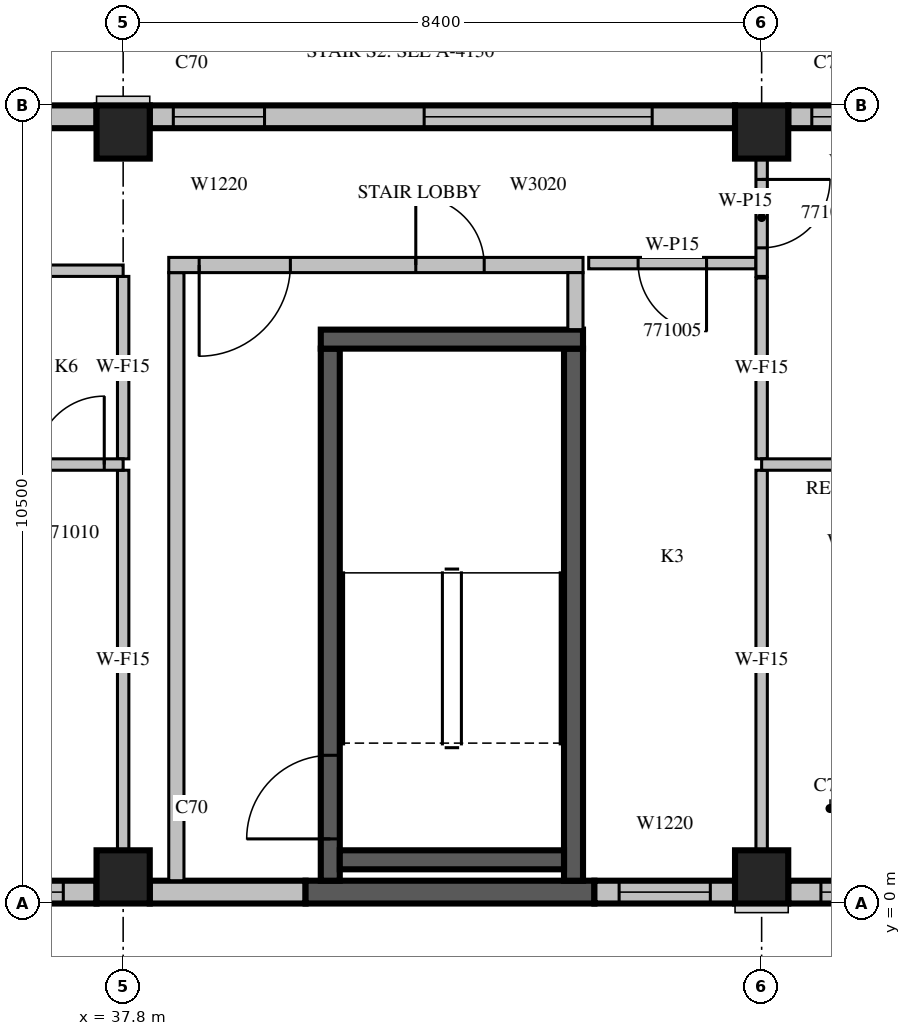
"""IFC4 building model, lengths in metres.
Left out: names, types, materials, properties, quantities, classifications, styles, units other than length and angle.
Written with IfcOpenShell. Run it as: python <this file> out.ifc"""

import sys

from ifc_helpers import new_model, si_unit, direction, frame, frame_2d, origin, origin_2d, place, context, subcontext, project, spatial, rectangle, extrude, source, transform, mapped, element, fill, save


model = new_model("IFC4")
c1 = context("Model", 3, precision=1e-05, world=origin(), true_north=direction((0.0, 1.0)))
c2 = subcontext(c1, "Body", "Model", "MODEL_VIEW")
j1 = project(units=[si_unit("LENGTHUNIT", "METRE"), si_unit("PLANEANGLEUNIT", "RADIAN")], contexts=[c1])
p1 = place(None, origin())
s1 = spatial("IfcSite", under=j1, at=p1, CompositionType="ELEMENT")
p2 = place(p1, origin())
s2 = spatial("IfcBuilding", under=s1, at=p2, CompositionType="ELEMENT")
p3 = place(p2, frame((0.0, 0.0, 309.0)))
s3 = spatial("IfcBuildingStorey", under=s2, at=p3, CompositionType="ELEMENT", Elevation=309.0)
m1 = source(origin(), c2, "Body", "SweptSolid", [
    extrude(rectangle(XDim=0.7, YDim=0.7, at=origin_2d()), origin(), (0.0, 0.0, 1.0), 3.5),
])
for number, where, z_axis, x_axis in (
    (1, (37.8, 0.35, 0.0), (0.0, 0.0, 1.0), (1.0, 0.0, 0.0)),
    (2, (46.2, 0.35, 0.0), (0.0, 0.0, 1.0), (1.0, 0.0, 0.0)),
    (3, (37.8, 10.15, 0.0), (0.0, 0.0, 1.0), (1.0, 0.0, 0.0)),
    (4, (46.2, 10.15, 0.0), (0.0, 0.0, 1.0), (1.0, 0.0, 0.0)),
):
    element("IfcColumn", number, at=place(p3, frame(where, z_axis=z_axis, x_axis=x_axis)), inside=s3, PredefinedType="COLUMN", context=c2, shape_type="MappedRepresentation", body=[
        mapped(m1, transform((0.0, 0.0, 0.0), scale=1.0)),
    ])
m2 = source(origin(), c2, "Body", "SweptSolid", [
    extrude(rectangle(XDim=7.7, YDim=0.3, at=frame_2d((3.85, 0.0))), origin(), (0.0, 0.0, 1.0), 3.1),
])
p4 = place(p3, frame((29.75, 0.15, 0.0), z_axis=(0.0, 0.0, 1.0), x_axis=(1.0, 0.0, 0.0)))
e5 = element("IfcWall", 5, at=p4, inside=s3, PredefinedType="STANDARD", context=c2, shape_type="MappedRepresentation", body=[
    mapped(m2, transform((0.0, 0.0, 0.0), scale=1.0)),
])
m3 = source(origin(), c2, "Body", "SweptSolid", [
    extrude(rectangle(XDim=1.2, YDim=2.0, at=frame_2d((0.6, 1.0))), frame((0.0, 0.16, 0.0), z_axis=(0.0, -1.0, 0.0), x_axis=(1.0, 0.0, 0.0)), (0.0, 0.0, 1.0), 0.32),
])
p5 = place(p4, frame((0.537, 0.0, 0.6)))
e6 = element("IfcOpeningElement", 6, at=p5, cuts=e5, PredefinedType="OPENING", context=c2, shape_type="MappedRepresentation", body=[
    mapped(m3, transform((0.0, 0.0, 0.0), scale=1.0)),
])
p6 = place(p4, frame((6.062, 0.0, 0.6)))
e7 = element("IfcOpeningElement", 7, at=p6, cuts=e5, PredefinedType="OPENING", context=c2, shape_type="MappedRepresentation", body=[
    mapped(m3, transform((0.0, 0.0, 0.0), scale=1.0)),
])
m4 = source(origin(), c2, "Body", "SweptSolid", [
    extrude(rectangle(XDim=2.05, YDim=0.3, at=frame_2d((1.025, 0.0))), origin(), (0.0, 0.0, 1.0), 3.1),
])
p7 = place(p3, frame((38.15, 0.15, 0.0), z_axis=(0.0, 0.0, 1.0), x_axis=(1.0, 0.0, 0.0)))
e8 = element("IfcWall", 8, at=p7, inside=s3, PredefinedType="STANDARD", context=c2, shape_type="MappedRepresentation", body=[
    mapped(m4, transform((0.0, 0.0, 0.0), scale=1.0)),
])
m5 = source(origin(), c2, "Body", "SweptSolid", [
    extrude(rectangle(XDim=3.8, YDim=0.3, at=frame_2d((1.9, 0.0))), origin(), (0.0, 0.0, 1.0), 3.1),
])
p8 = place(p3, frame((40.2, 0.15, 0.0), z_axis=(0.0, 0.0, 1.0), x_axis=(1.0, 0.0, 0.0)))
e9 = element("IfcWall", 9, at=p8, inside=s3, PredefinedType="SOLIDWALL", context=c2, shape_type="MappedRepresentation", body=[
    mapped(m5, transform((0.0, 0.0, 0.0), scale=1.0)),
])
m6 = source(origin(), c2, "Body", "SweptSolid", [
    extrude(rectangle(XDim=1.85, YDim=0.3, at=frame_2d((0.925, 0.0))), origin(), (0.0, 0.0, 1.0), 3.1),
])
p9 = place(p3, frame((44.0, 0.15, 0.0), z_axis=(0.0, 0.0, 1.0), x_axis=(1.0, 0.0, 0.0)))
e10 = element("IfcWall", 10, at=p9, inside=s3, PredefinedType="STANDARD", context=c2, shape_type="MappedRepresentation", body=[
    mapped(m6, transform((0.0, 0.0, 0.0), scale=1.0)),
])
p10 = place(p9, frame((0.325, 0.0, 0.6)))
e11 = element("IfcOpeningElement", 11, at=p10, cuts=e10, PredefinedType="OPENING", context=c2, shape_type="MappedRepresentation", body=[
    mapped(m3, transform((0.0, 0.0, 0.0), scale=1.0)),
])
m7 = source(origin(), c2, "Body", "SweptSolid", [
    extrude(rectangle(XDim=3.01, YDim=0.3, at=frame_2d((1.505, 0.0))), origin(), (0.0, 0.0, 1.0), 3.1),
])
p11 = place(p3, frame((46.55, 0.15, 0.0), z_axis=(0.0, 0.0, 1.0), x_axis=(1.0, 0.0, 0.0)))
e12 = element("IfcWall", 12, at=p11, inside=s3, PredefinedType="STANDARD", context=c2, shape_type="MappedRepresentation", body=[
    mapped(m7, transform((0.0, 0.0, 0.0), scale=1.0)),
])
m8 = source(origin(), c2, "Body", "SweptSolid", [
    extrude(rectangle(XDim=1.8, YDim=2.0, at=frame_2d((0.9, 1.0))), frame((0.0, 0.16, 0.0), z_axis=(0.0, -1.0, 0.0), x_axis=(1.0, 0.0, 0.0)), (0.0, 0.0, 1.0), 0.32),
])
p12 = place(p11, frame((0.43, 0.0, 0.6)))
e13 = element("IfcOpeningElement", 13, at=p12, cuts=e12, PredefinedType="OPENING", context=c2, shape_type="MappedRepresentation", body=[
    mapped(m8, transform((0.0, 0.0, 0.0), scale=1.0)),
])
p13 = place(p3, frame((49.56, 10.35, 0.0), z_axis=(0.0, 0.0, 1.0), x_axis=(-1.0, 0.0, 0.0)))
e14 = element("IfcWall", 14, at=p13, inside=s3, PredefinedType="STANDARD", context=c2, shape_type="MappedRepresentation", body=[
    mapped(m7, transform((0.0, 0.0, 0.0), scale=1.0)),
])
p14 = place(p13, frame((1.5, 0.0, 0.6)))
e15 = element("IfcOpeningElement", 15, at=p14, cuts=e14, PredefinedType="OPENING", context=c2, shape_type="MappedRepresentation", body=[
    mapped(m3, transform((0.0, 0.0, 0.0), scale=1.0)),
])
p15 = place(p3, frame((45.85, 10.35, 0.0), z_axis=(0.0, 0.0, 1.0), x_axis=(-1.0, 0.0, 0.0)))
e16 = element("IfcWall", 16, at=p15, inside=s3, PredefinedType="STANDARD", context=c2, shape_type="MappedRepresentation", body=[
    mapped(m2, transform((0.0, 0.0, 0.0), scale=1.0)),
])
m9 = source(origin(), c2, "Body", "SweptSolid", [
    extrude(rectangle(XDim=3.0, YDim=2.0, at=frame_2d((1.5, 1.0))), frame((0.0, 0.16, 0.0), z_axis=(0.0, -1.0, 0.0), x_axis=(1.0, 0.0, 0.0)), (0.0, 0.0, 1.0), 0.32),
])
p16 = place(p15, frame((1.09, 0.0, 0.6)))
e17 = element("IfcOpeningElement", 17, at=p16, cuts=e16, PredefinedType="OPENING", context=c2, shape_type="MappedRepresentation", body=[
    mapped(m9, transform((0.0, 0.0, 0.0), scale=1.0)),
])
p17 = place(p15, frame((6.19, 0.0, 0.6)))
e18 = element("IfcOpeningElement", 18, at=p17, cuts=e16, PredefinedType="OPENING", context=c2, shape_type="MappedRepresentation", body=[
    mapped(m3, transform((0.0, 0.0, 0.0), scale=1.0)),
])
p18 = place(p3, frame((37.45, 10.35, 0.0), z_axis=(0.0, 0.0, 1.0), x_axis=(-1.0, 0.0, 0.0)))
e19 = element("IfcWall", 19, at=p18, inside=s3, PredefinedType="STANDARD", context=c2, shape_type="MappedRepresentation", body=[
    mapped(m2, transform((0.0, 0.0, 0.0), scale=1.0)),
])
p19 = place(p18, frame((1.09, 0.0, 0.6)))
e20 = element("IfcOpeningElement", 20, at=p19, cuts=e19, PredefinedType="OPENING", context=c2, shape_type="MappedRepresentation", body=[
    mapped(m9, transform((0.0, 0.0, 0.0), scale=1.0)),
])
p20 = place(p18, frame((6.19, 0.0, 0.6)))
e21 = element("IfcOpeningElement", 21, at=p20, cuts=e19, PredefinedType="OPENING", context=c2, shape_type="MappedRepresentation", body=[
    mapped(m3, transform((0.0, 0.0, 0.0), scale=1.0)),
])
m10 = source(origin(), c2, "Body", "SweptSolid", [
    extrude(rectangle(XDim=7.0, YDim=0.25, at=frame_2d((3.5, 0.0))), origin(), (0.0, 0.0, 1.0), 3.1),
])
p21 = place(p3, frame((40.525, 0.3, 0.0), z_axis=(0.0, 0.0, 1.0), x_axis=(0.0, 1.0, 0.0)))
e22 = element("IfcWall", 22, at=p21, inside=s3, PredefinedType="SOLIDWALL", context=c2, shape_type="MappedRepresentation", body=[
    mapped(m10, transform((0.0, 0.0, 0.0), scale=1.0)),
])
m11 = source(origin(), c2, "Body", "SweptSolid", [
    extrude(rectangle(XDim=1.1, YDim=2.1, at=frame_2d((0.55, 1.05))), frame((0.0, 0.135, 0.0), z_axis=(0.0, -1.0, 0.0), x_axis=(1.0, 0.0, 0.0)), (0.0, 0.0, 1.0), 0.27),
])
p22 = place(p21, frame((0.55, 0.0, 0.0)))
e23 = element("IfcOpeningElement", 23, at=p22, cuts=e22, PredefinedType="OPENING", context=c2, shape_type="MappedRepresentation", body=[
    mapped(m11, transform((0.0, 0.0, 0.0), scale=1.0)),
])
p23 = place(p3, frame((43.725, 0.3, 0.0), z_axis=(0.0, 0.0, 1.0), x_axis=(0.0, 1.0, 0.0)))
e24 = element("IfcWall", 24, at=p23, inside=s3, PredefinedType="SOLIDWALL", context=c2, shape_type="MappedRepresentation", body=[
    mapped(m10, transform((0.0, 0.0, 0.0), scale=1.0)),
])
m12 = source(origin(), c2, "Body", "SweptSolid", [
    extrude(rectangle(XDim=3.45, YDim=0.25, at=frame_2d((1.725, 0.0))), origin(), (0.0, 0.0, 1.0), 3.1),
])
p24 = place(p3, frame((40.4, 7.425, 0.0), z_axis=(0.0, 0.0, 1.0), x_axis=(1.0, 0.0, 0.0)))
e25 = element("IfcWall", 25, at=p24, inside=s3, PredefinedType="SOLIDWALL", context=c2, shape_type="MappedRepresentation", body=[
    mapped(m12, transform((0.0, 0.0, 0.0), scale=1.0)),
])
m13 = source(origin(), c2, "Body", "SweptSolid", [
    extrude(rectangle(XDim=2.95, YDim=0.25, at=frame_2d((1.475, 0.0))), origin(), (0.0, 0.0, 1.0), 3.1),
])
p25 = place(p3, frame((40.65, 0.575, 0.0), z_axis=(0.0, 0.0, 1.0), x_axis=(1.0, 0.0, 0.0)))
e26 = element("IfcWall", 26, at=p25, inside=s3, PredefinedType="SOLIDWALL", context=c2, shape_type="MappedRepresentation", body=[
    mapped(m13, transform((0.0, 0.0, 0.0), scale=1.0)),
])
m14 = source(origin(), c2, "Body", "SweptSolid", [
    extrude(rectangle(XDim=8.0, YDim=0.2, at=frame_2d((4.0, 0.0))), origin(), (0.0, 0.0, 1.0), 3.1),
])
p26 = place(p3, frame((38.5, 0.3, 0.0), z_axis=(0.0, 0.0, 1.0), x_axis=(0.0, 1.0, 0.0)))
e27 = element("IfcWall", 27, at=p26, inside=s3, PredefinedType="PARTITIONING", context=c2, shape_type="MappedRepresentation", body=[
    mapped(m14, transform((0.0, 0.0, 0.0), scale=1.0)),
])
m15 = source(origin(), c2, "Body", "SweptSolid", [
    extrude(rectangle(XDim=5.45, YDim=0.2, at=frame_2d((2.725, 0.0))), origin(), (0.0, 0.0, 1.0), 3.1),
])
p27 = place(p3, frame((38.4, 8.4, 0.0), z_axis=(0.0, 0.0, 1.0), x_axis=(1.0, 0.0, 0.0)))
e28 = element("IfcWall", 28, at=p27, inside=s3, PredefinedType="PARTITIONING", context=c2, shape_type="MappedRepresentation", body=[
    mapped(m15, transform((0.0, 0.0, 0.0), scale=1.0)),
])
m16 = source(origin(), c2, "Body", "SweptSolid", [
    extrude(rectangle(XDim=1.2, YDim=2.1, at=frame_2d((0.6, 1.05))), frame((0.0, 0.11, 0.0), z_axis=(0.0, -1.0, 0.0), x_axis=(1.0, 0.0, 0.0)), (0.0, 0.0, 1.0), 0.22),
])
p28 = place(p27, frame((0.4, 0.0, 0.0)))
e29 = element("IfcOpeningElement", 29, at=p28, cuts=e28, PredefinedType="OPENING", context=c2, shape_type="MappedRepresentation", body=[
    mapped(m16, transform((0.0, 0.0, 0.0), scale=1.0)),
])
m17 = source(origin(), c2, "Body", "SweptSolid", [
    extrude(rectangle(XDim=0.9, YDim=2.1, at=frame_2d((0.45, 1.05))), frame((0.0, 0.11, 0.0), z_axis=(0.0, -1.0, 0.0), x_axis=(1.0, 0.0, 0.0)), (0.0, 0.0, 1.0), 0.22),
])
p29 = place(p27, frame((3.25, 0.0, 0.0)))
e30 = element("IfcOpeningElement", 30, at=p29, cuts=e28, PredefinedType="OPENING", context=c2, shape_type="MappedRepresentation", body=[
    mapped(m17, transform((0.0, 0.0, 0.0), scale=1.0)),
])
m18 = source(origin(), c2, "Body", "SweptSolid", [
    extrude(rectangle(XDim=0.75, YDim=0.2, at=frame_2d((0.375, 0.0))), origin(), (0.0, 0.0, 1.0), 3.1),
])
p30 = place(p3, frame((43.75, 7.55, 0.0), z_axis=(0.0, 0.0, 1.0), x_axis=(0.0, 1.0, 0.0)))
e31 = element("IfcWall", 31, at=p30, inside=s3, PredefinedType="PARTITIONING", context=c2, shape_type="MappedRepresentation", body=[
    mapped(m18, transform((0.0, 0.0, 0.0), scale=1.0)),
])
m19 = source(origin(), c2, "Body", "SweptSolid", [
    extrude(rectangle(XDim=2.2, YDim=0.15, at=frame_2d((1.1, 0.0))), origin(), (0.0, 0.0, 1.0), 3.1),
])
p31 = place(p3, frame((46.125, 8.425, 0.0), z_axis=(0.0, 0.0, 1.0), x_axis=(-1.0, 0.0, 0.0)))
e32 = element("IfcWall", 32, at=p31, inside=s3, PredefinedType="PARTITIONING", context=c2, shape_type="MappedRepresentation", body=[
    mapped(m19, transform((0.0, 0.0, 0.0), scale=1.0)),
])
m20 = source(origin(), c2, "Body", "SweptSolid", [
    extrude(rectangle(XDim=0.9, YDim=2.1, at=frame_2d((0.45, 1.05))), frame((0.0, 0.085, 0.0), z_axis=(0.0, -1.0, 0.0), x_axis=(1.0, 0.0, 0.0)), (0.0, 0.0, 1.0), 0.17),
])
p32 = place(p31, frame((0.65, 0.0, 0.0)))
e33 = element("IfcOpeningElement", 33, at=p32, cuts=e32, PredefinedType="OPENING", context=c2, shape_type="MappedRepresentation", body=[
    mapped(m20, transform((0.0, 0.0, 0.0), scale=1.0)),
])
m21 = source(origin(), c2, "Body", "SweptSolid", [
    extrude(rectangle(XDim=5.001, YDim=0.15, at=frame_2d((2.501, 0.0))), origin(), (0.0, 0.0, 1.0), 3.1),
])
p33 = place(p3, frame((37.8, 0.699, 0.0), z_axis=(0.0, 0.0, 1.0), x_axis=(0.0, 1.0, 0.0)))
e34 = element("IfcWall", 34, at=p33, inside=s3, PredefinedType="PARTITIONING", context=c2, shape_type="MappedRepresentation", body=[
    mapped(m21, transform((0.0, 0.0, 0.0), scale=1.0)),
])
m22 = source(origin(), c2, "Body", "SweptSolid", [
    extrude(rectangle(XDim=2.4, YDim=0.15, at=frame_2d((1.2, 0.0))), origin(), (0.0, 0.0, 1.0), 3.1),
])
p34 = place(p3, frame((37.8, 5.85, 0.0), z_axis=(0.0, 0.0, 1.0), x_axis=(0.0, 1.0, 0.0)))
e35 = element("IfcWall", 35, at=p34, inside=s3, PredefinedType="PARTITIONING", context=c2, shape_type="MappedRepresentation", body=[
    mapped(m22, transform((0.0, 0.0, 0.0), scale=1.0)),
])
m23 = source(origin(), c2, "Body", "SweptSolid", [
    extrude(rectangle(XDim=8.4, YDim=0.15, at=frame_2d((4.2, 0.0))), origin(), (0.0, 0.0, 1.0), 3.1),
])
p35 = place(p3, frame((37.8, 5.775, 0.0), z_axis=(0.0, 0.0, 1.0), x_axis=(-1.0, 0.0, 0.0)))
e36 = element("IfcWall", 36, at=p35, inside=s3, PredefinedType="PARTITIONING", context=c2, shape_type="MappedRepresentation", body=[
    mapped(m23, transform((0.0, 0.0, 0.0), scale=1.0)),
])
m24 = source(origin(), c2, "Body", "SweptSolid", [
    extrude(rectangle(XDim=1.0, YDim=2.1, at=frame_2d((0.5, 1.05))), frame((0.0, 0.085, 0.0), z_axis=(0.0, -1.0, 0.0), x_axis=(1.0, 0.0, 0.0)), (0.0, 0.0, 1.0), 0.17),
])
p36 = place(p35, frame((4.332, 0.0, 0.0)))
e37 = element("IfcOpeningElement", 37, at=p36, cuts=e36, PredefinedType="OPENING", context=c2, shape_type="MappedRepresentation", body=[
    mapped(m24, transform((0.0, 0.0, 0.0), scale=1.0)),
])
p37 = place(p35, frame((6.433, 0.0, 0.0)))
e38 = element("IfcOpeningElement", 38, at=p37, cuts=e36, PredefinedType="OPENING", context=c2, shape_type="MappedRepresentation", body=[
    mapped(m20, transform((0.0, 0.0, 0.0), scale=1.0)),
])
p38 = place(p35, frame((0.248, 0.0, 0.0)))
e39 = element("IfcOpeningElement", 39, at=p38, cuts=e36, PredefinedType="OPENING", context=c2, shape_type="MappedRepresentation", body=[
    mapped(m20, transform((0.0, 0.0, 0.0), scale=1.0)),
])
m25 = source(origin(), c2, "Body", "SweptSolid", [
    extrude(rectangle(XDim=1.551, YDim=0.15, at=frame_2d((0.775, 0.0))), origin(), (0.0, 0.0, 1.0), 3.1),
])
p39 = place(p3, frame((46.2, 9.801, 0.0), z_axis=(0.0, 0.0, 1.0), x_axis=(0.0, -1.0, 0.0)))
e40 = element("IfcWall", 40, at=p39, inside=s3, PredefinedType="PARTITIONING", context=c2, shape_type="MappedRepresentation", body=[
    mapped(m25, transform((0.0, 0.0, 0.0), scale=1.0)),
])
p40 = place(p39, frame((0.275, 0.0, 0.0)))
e41 = element("IfcOpeningElement", 41, at=p40, cuts=e40, PredefinedType="OPENING", context=c2, shape_type="MappedRepresentation", body=[
    mapped(m20, transform((0.0, 0.0, 0.0), scale=1.0)),
])
p41 = place(p3, frame((46.2, 0.699, 0.0), z_axis=(0.0, 0.0, 1.0), x_axis=(0.0, 1.0, 0.0)))
e42 = element("IfcWall", 42, at=p41, inside=s3, PredefinedType="PARTITIONING", context=c2, shape_type="MappedRepresentation", body=[
    mapped(m21, transform((0.0, 0.0, 0.0), scale=1.0)),
])
m26 = source(origin(), c2, "Body", "SweptSolid", [
    extrude(rectangle(XDim=2.38, YDim=0.15, at=frame_2d((1.19, 0.0))), origin(), (0.0, 0.0, 1.0), 3.1),
])
p42 = place(p3, frame((46.2, 5.85, 0.0), z_axis=(0.0, 0.0, 1.0), x_axis=(0.0, 1.0, 0.0)))
e43 = element("IfcWall", 43, at=p42, inside=s3, PredefinedType="PARTITIONING", context=c2, shape_type="MappedRepresentation", body=[
    mapped(m26, transform((0.0, 0.0, 0.0), scale=1.0)),
])
m27 = source(origin(), c2, "Body", "SweptSolid", [
    extrude(rectangle(XDim=3.06, YDim=0.15, at=frame_2d((1.53, 0.0))), origin(), (0.0, 0.0, 1.0), 3.1),
])
p43 = place(p3, frame((49.26, 5.775, 0.0), z_axis=(0.0, 0.0, 1.0), x_axis=(-1.0, 0.0, 0.0)))
e44 = element("IfcWall", 44, at=p43, inside=s3, PredefinedType="PARTITIONING", context=c2, shape_type="MappedRepresentation", body=[
    mapped(m27, transform((0.0, 0.0, 0.0), scale=1.0)),
])
p44 = place(p3, frame((37.8, 8.325, 0.0), z_axis=(0.0, 0.0, 1.0), x_axis=(-1.0, 0.0, 0.0)))
e45 = element("IfcWall", 45, at=p44, inside=s3, PredefinedType="PARTITIONING", context=c2, shape_type="MappedRepresentation", body=[
    mapped(m23, transform((0.0, 0.0, 0.0), scale=1.0)),
])
p45 = place(p44, frame((3.933, 0.0, 0.0)))
e46 = element("IfcOpeningElement", 46, at=p45, cuts=e45, PredefinedType="OPENING", context=c2, shape_type="MappedRepresentation", body=[
    mapped(m24, transform((0.0, 0.0, 0.0), scale=1.0)),
])
m28 = source(origin(), c2, "Body", "SweptSolid", [
    extrude(rectangle(XDim=1.2, YDim=2.0, at=frame_2d((0.6, 1.0))), frame((0.0, 0.03, 0.0), z_axis=(0.0, -1.0, 0.0), x_axis=(1.0, 0.0, 0.0)), (0.0, 0.0, 1.0), 0.06),
])
p46 = place(p6, origin())
e47 = element("IfcWindow", 47, at=p46, inside=s3, PartitioningType="SINGLE_PANEL", PredefinedType="WINDOW", context=c2, shape_type="MappedRepresentation", body=[
    mapped(m28, transform((0.0, 0.0, 0.0), scale=1.0)),
])
fill(e7, e47)
p47 = place(p10, origin())
e48 = element("IfcWindow", 48, at=p47, inside=s3, PartitioningType="SINGLE_PANEL", PredefinedType="WINDOW", context=c2, shape_type="MappedRepresentation", body=[
    mapped(m28, transform((0.0, 0.0, 0.0), scale=1.0)),
])
fill(e11, e48)
m29 = source(origin(), c2, "Body", "SweptSolid", [
    extrude(rectangle(XDim=1.8, YDim=2.0, at=frame_2d((0.9, 1.0))), frame((0.0, 0.03, 0.0), z_axis=(0.0, -1.0, 0.0), x_axis=(1.0, 0.0, 0.0)), (0.0, 0.0, 1.0), 0.06),
])
p48 = place(p12, origin())
e49 = element("IfcWindow", 49, at=p48, inside=s3, PartitioningType="SINGLE_PANEL", PredefinedType="WINDOW", context=c2, shape_type="MappedRepresentation", body=[
    mapped(m29, transform((0.0, 0.0, 0.0), scale=1.0)),
])
fill(e13, e49)
p49 = place(p14, origin())
e50 = element("IfcWindow", 50, at=p49, inside=s3, PartitioningType="SINGLE_PANEL", PredefinedType="WINDOW", context=c2, shape_type="MappedRepresentation", body=[
    mapped(m28, transform((0.0, 0.0, 0.0), scale=1.0)),
])
fill(e15, e50)
m30 = source(origin(), c2, "Body", "SweptSolid", [
    extrude(rectangle(XDim=3.0, YDim=2.0, at=frame_2d((1.5, 1.0))), frame((0.0, 0.03, 0.0), z_axis=(0.0, -1.0, 0.0), x_axis=(1.0, 0.0, 0.0)), (0.0, 0.0, 1.0), 0.06),
])
p50 = place(p16, origin())
e51 = element("IfcWindow", 51, at=p50, inside=s3, PartitioningType="SINGLE_PANEL", PredefinedType="WINDOW", context=c2, shape_type="MappedRepresentation", body=[
    mapped(m30, transform((0.0, 0.0, 0.0), scale=1.0)),
])
fill(e17, e51)
p51 = place(p17, origin())
e52 = element("IfcWindow", 52, at=p51, inside=s3, PartitioningType="SINGLE_PANEL", PredefinedType="WINDOW", context=c2, shape_type="MappedRepresentation", body=[
    mapped(m28, transform((0.0, 0.0, 0.0), scale=1.0)),
])
fill(e18, e52)
m31 = source(origin(), c2, "Body", "SweptSolid", [
    extrude(rectangle(XDim=1.1, YDim=2.1, at=frame_2d((0.55, 1.05))), frame((0.0, 0.025, 0.0), z_axis=(0.0, -1.0, 0.0), x_axis=(1.0, 0.0, 0.0)), (0.0, 0.0, 1.0), 0.05),
])
p52 = place(p22, origin())
e53 = element("IfcDoor", 53, at=p52, inside=s3, OperationType="SINGLE_SWING_LEFT", PredefinedType="DOOR", context=c2, shape_type="MappedRepresentation", body=[
    mapped(m31, transform((0.0, 0.0, 0.0), scale=1.0)),
])
fill(e23, e53)
m32 = source(origin(), c2, "Body", "SweptSolid", [
    extrude(rectangle(XDim=1.2, YDim=2.1, at=frame_2d((0.6, 1.05))), frame((0.0, 0.025, 0.0), z_axis=(0.0, -1.0, 0.0), x_axis=(1.0, 0.0, 0.0)), (0.0, 0.0, 1.0), 0.05),
])
p53 = place(p28, origin())
e54 = element("IfcDoor", 54, at=p53, inside=s3, OperationType="SINGLE_SWING_RIGHT", PredefinedType="DOOR", context=c2, shape_type="MappedRepresentation", body=[
    mapped(m32, transform((0.0, 0.0, 0.0), scale=1.0)),
])
fill(e29, e54)
m33 = source(origin(), c2, "Body", "SweptSolid", [
    extrude(rectangle(XDim=0.9, YDim=2.1, at=frame_2d((0.45, 1.05))), frame((0.0, 0.025, 0.0), z_axis=(0.0, -1.0, 0.0), x_axis=(1.0, 0.0, 0.0)), (0.0, 0.0, 1.0), 0.05),
])
p54 = place(p29, origin())
e55 = element("IfcDoor", 55, at=p54, inside=s3, OperationType="SINGLE_SWING_LEFT", PredefinedType="DOOR", context=c2, shape_type="MappedRepresentation", body=[
    mapped(m33, transform((0.0, 0.0, 0.0), scale=1.0)),
])
fill(e30, e55)
p55 = place(p32, origin())
e56 = element("IfcDoor", 56, at=p55, inside=s3, OperationType="SINGLE_SWING_LEFT", PredefinedType="DOOR", context=c2, shape_type="MappedRepresentation", body=[
    mapped(m33, transform((0.0, 0.0, 0.0), scale=1.0)),
])
fill(e33, e56)
p56 = place(p38, origin())
e57 = element("IfcDoor", 57, at=p56, inside=s3, OperationType="SINGLE_SWING_RIGHT", PredefinedType="DOOR", context=c2, shape_type="MappedRepresentation", body=[
    mapped(m33, transform((0.0, 0.0, 0.0), scale=1.0)),
])
fill(e39, e57)
p57 = place(p40, origin())
e58 = element("IfcDoor", 58, at=p57, inside=s3, OperationType="SINGLE_SWING_LEFT", PredefinedType="DOOR", context=c2, shape_type="MappedRepresentation", body=[
    mapped(m33, transform((0.0, 0.0, 0.0), scale=1.0)),
])
fill(e41, e58)
save(model, sys.argv[1])
